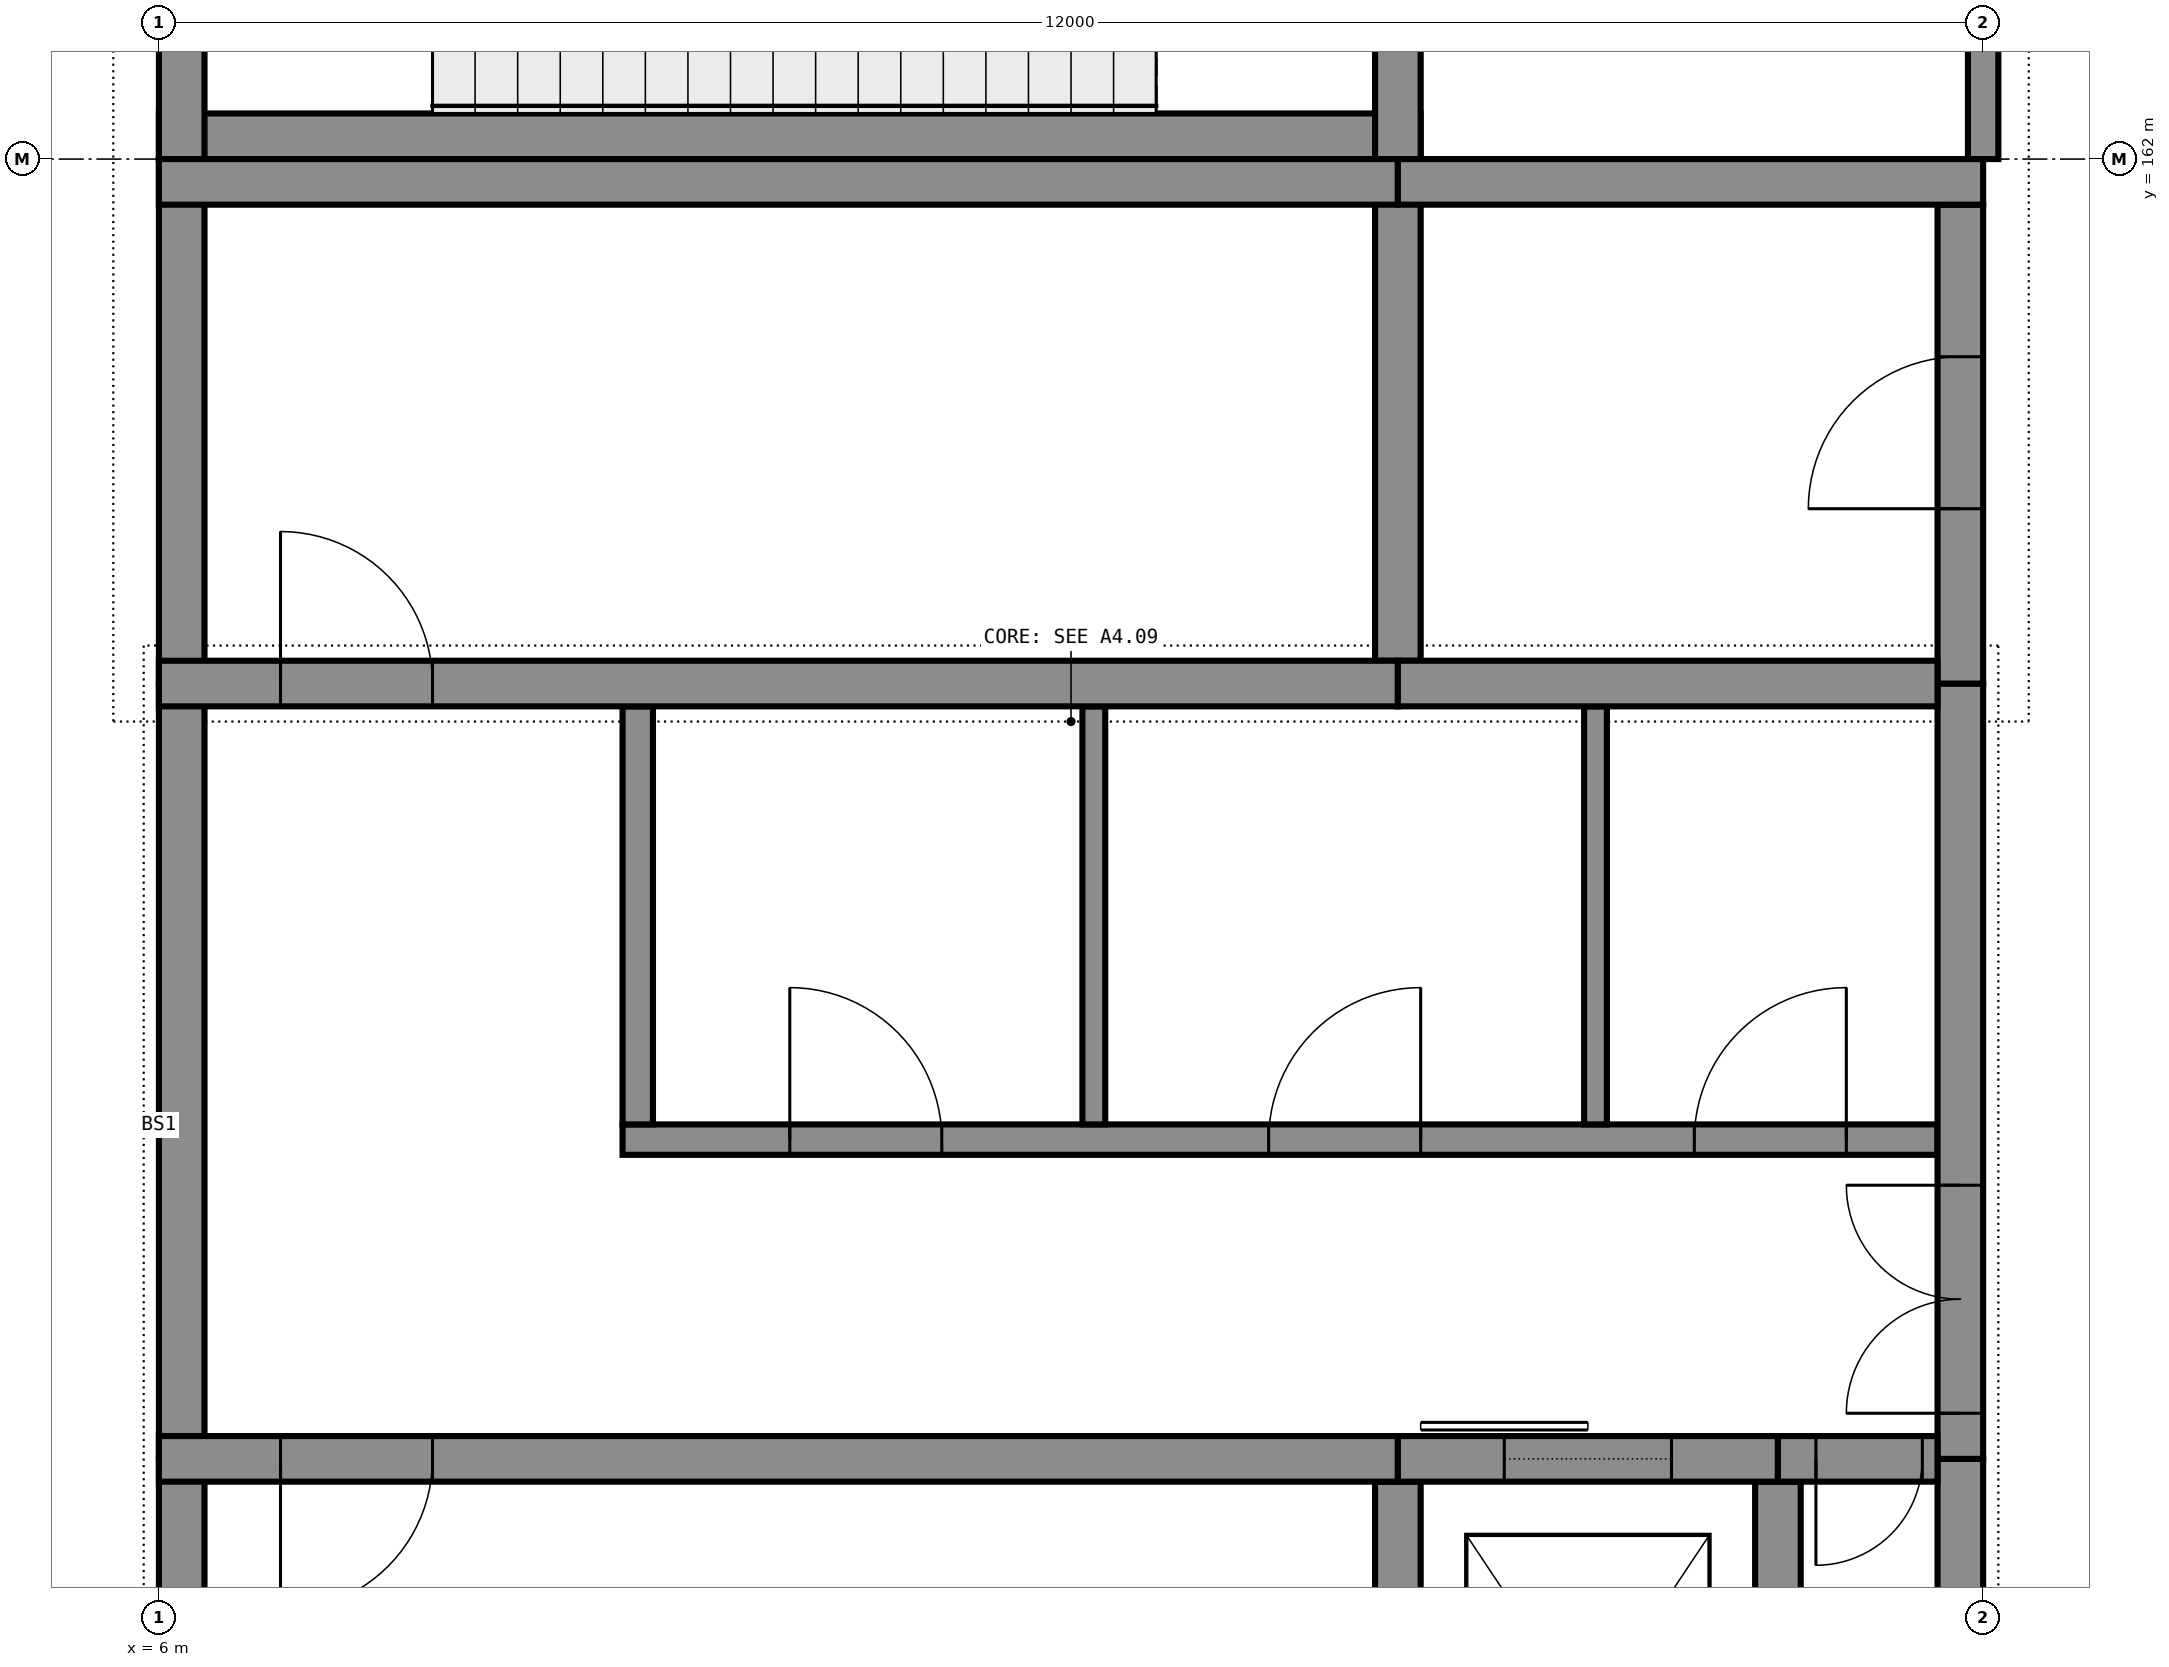
"""IFC4 building model, lengths in metres.
Left out: names, types, materials, properties, quantities, classifications, styles, units other than length and angle.
Written with IfcOpenShell. Run it as: python <this file> out.ifc"""

import sys

from ifc_helpers import new_model, si_unit, direction, frame, frame_2d, origin, place, context, subcontext, project, spatial, rectangle, extrude, element, fill, save


model = new_model("IFC4")
c1 = context("Model", 3, precision=1e-05, world=origin(), true_north=direction((0.0, 1.0)))
c2 = subcontext(c1, "Body", "Model", "MODEL_VIEW")
j1 = project(units=[si_unit("LENGTHUNIT", "METRE"), si_unit("PLANEANGLEUNIT", "RADIAN")], contexts=[c1])
p1 = place(None, origin())
s1 = spatial("IfcSite", under=j1, at=p1, CompositionType="ELEMENT")
p2 = place(p1, origin())
s2 = spatial("IfcBuilding", under=s1, at=p2, CompositionType="ELEMENT")
p3 = place(p2, frame((0.0, 0.0, -6.0)))
s3 = spatial("IfcBuildingStorey", under=s2, at=p3, CompositionType="ELEMENT", Elevation=-6.0)
p4 = place(p3, frame((6.0, 162.15, 0.0), z_axis=(0.0, 0.0, 1.0), x_axis=(1.0, 0.0, 0.0)))
e1 = element("IfcWall", 1, at=p4, inside=s3, PredefinedType="SHEAR", context=c2, shape_type="SweptSolid", body=[
    extrude(rectangle(XDim=8.3, YDim=0.3, at=frame_2d((4.15, 0.0))), origin(), (0.0, 0.0, 1.0), 5.7),
])
for number, where, z_axis, x_axis in (
    (2, (6.15, 162.0, 0.0), (0.0, 0.0, 1.0), (0.0, 1.0, 0.0)),
    (3, (14.15, 162.0, 0.0), (0.0, 0.0, 1.0), (0.0, 1.0, 0.0)),
):
    element("IfcWall", number, at=place(p3, frame(where, z_axis=z_axis, x_axis=x_axis)), inside=s3, PredefinedType="SHEAR", context=c2, shape_type="SweptSolid", body=[
        extrude(rectangle(XDim=3.3, YDim=0.3, at=frame_2d((1.65, 0.0))), origin(), (0.0, 0.0, 1.0), 5.7),
    ])
p5 = place(p3, frame((6.0, 161.85, 0.0), z_axis=(0.0, 0.0, 1.0), x_axis=(1.0, 0.0, 0.0)))
e4 = element("IfcWall", 4, at=p5, inside=s3, PredefinedType="SHEAR", context=c2, shape_type="SweptSolid", body=[
    extrude(rectangle(XDim=8.15, YDim=0.3, at=frame_2d((4.075, 0.0))), origin(), (0.0, 0.0, 1.0), 5.7),
])
p6 = place(p3, frame((14.15, 161.85, 0.0), z_axis=(0.0, 0.0, 1.0), x_axis=(1.0, 0.0, 0.0)))
e5 = element("IfcWall", 5, at=p6, inside=s3, PredefinedType="SHEAR", context=c2, shape_type="SweptSolid", body=[
    extrude(rectangle(XDim=3.85, YDim=0.3, at=frame_2d((1.925, 0.0))), origin(), (0.0, 0.0, 1.0), 5.7),
])
p7 = place(p3, frame((6.0, 153.45, 0.0), z_axis=(0.0, 0.0, 1.0), x_axis=(1.0, 0.0, 0.0)))
e6 = element("IfcWall", 6, at=p7, inside=s3, PredefinedType="SHEAR", context=c2, shape_type="SweptSolid", body=[
    extrude(rectangle(XDim=8.15, YDim=0.3, at=frame_2d((4.075, 0.0))), origin(), (0.0, 0.0, 1.0), 5.7),
])
p8 = place(p7, frame((0.8, 0.0, 0.0)))
e7 = element("IfcOpeningElement", 7, at=p8, cuts=e6, PredefinedType="OPENING", context=c2, shape_type="SweptSolid", body=[
    extrude(rectangle(XDim=1.0, YDim=2.1, at=frame_2d((0.5, 1.05))), frame((0.0, 0.16, 0.0), z_axis=(0.0, -1.0, 0.0), x_axis=(1.0, 0.0, 0.0)), (0.0, 0.0, 1.0), 0.32),
])
p9 = place(p3, frame((14.15, 153.45, 0.0), z_axis=(0.0, 0.0, 1.0), x_axis=(1.0, 0.0, 0.0)))
e8 = element("IfcWall", 8, at=p9, inside=s3, PredefinedType="SHEAR", context=c2, shape_type="SweptSolid", body=[
    extrude(rectangle(XDim=2.5, YDim=0.3, at=frame_2d((1.25, 0.0))), origin(), (0.0, 0.0, 1.0), 5.7),
])
p10 = place(p9, frame((0.7, 0.0, 0.0)))
e9 = element("IfcOpeningElement", 9, at=p10, cuts=e8, PredefinedType="OPENING", context=c2, shape_type="SweptSolid", body=[
    extrude(rectangle(XDim=1.1, YDim=2.1, at=frame_2d((0.55, 1.05))), frame((0.0, 0.16, 0.0), z_axis=(0.0, -1.0, 0.0), x_axis=(1.0, 0.0, 0.0)), (0.0, 0.0, 1.0), 0.32),
])
p11 = place(p3, frame((16.65, 153.45, 0.0), z_axis=(0.0, 0.0, 1.0), x_axis=(1.0, 0.0, 0.0)))
e10 = element("IfcWall", 10, at=p11, inside=s3, PredefinedType="SHEAR", context=c2, shape_type="SweptSolid", body=[
    extrude(rectangle(XDim=1.05, YDim=0.3, at=frame_2d((0.525, 0.0))), origin(), (0.0, 0.0, 1.0), 5.7),
])
p12 = place(p11, frame((0.25, 0.0, 0.0)))
e11 = element("IfcOpeningElement", 11, at=p12, cuts=e10, PredefinedType="OPENING", context=c2, shape_type="SweptSolid", body=[
    extrude(rectangle(XDim=0.7, YDim=2.1, at=frame_2d((0.35, 1.05))), frame((0.0, 0.16, 0.0), z_axis=(0.0, -1.0, 0.0), x_axis=(1.0, 0.0, 0.0)), (0.0, 0.0, 1.0), 0.32),
])
p13 = place(p3, frame((6.0, 158.55, 0.0), z_axis=(0.0, 0.0, 1.0), x_axis=(1.0, 0.0, 0.0)))
e12 = element("IfcWall", 12, at=p13, inside=s3, PredefinedType="SHEAR", context=c2, shape_type="SweptSolid", body=[
    extrude(rectangle(XDim=8.15, YDim=0.3, at=frame_2d((4.075, 0.0))), origin(), (0.0, 0.0, 1.0), 5.7),
])
p14 = place(p13, frame((0.8, 0.0, 0.0)))
e13 = element("IfcOpeningElement", 13, at=p14, cuts=e12, PredefinedType="OPENING", context=c2, shape_type="SweptSolid", body=[
    extrude(rectangle(XDim=1.0, YDim=2.1, at=frame_2d((0.5, 1.05))), frame((0.0, 0.16, 0.0), z_axis=(0.0, -1.0, 0.0), x_axis=(1.0, 0.0, 0.0)), (0.0, 0.0, 1.0), 0.32),
])
p15 = place(p3, frame((14.15, 158.55, 0.0), z_axis=(0.0, 0.0, 1.0), x_axis=(1.0, 0.0, 0.0)))
e14 = element("IfcWall", 14, at=p15, inside=s3, PredefinedType="SHEAR", context=c2, shape_type="SweptSolid", body=[
    extrude(rectangle(XDim=3.55, YDim=0.3, at=frame_2d((1.775, 0.0))), origin(), (0.0, 0.0, 1.0), 5.7),
])
p16 = place(p3, frame((6.15, 150.3, 0.0), z_axis=(0.0, 0.0, 1.0), x_axis=(0.0, 1.0, 0.0)))
e15 = element("IfcWall", 15, at=p16, inside=s3, PredefinedType="SHEAR", context=c2, shape_type="SweptSolid", body=[
    extrude(rectangle(XDim=3.15, YDim=0.3, at=frame_2d((1.575, 0.0))), origin(), (0.0, 0.0, 1.0), 5.7),
])
p17 = place(p3, frame((6.15, 153.45, 0.0), z_axis=(0.0, 0.0, 1.0), x_axis=(0.0, 1.0, 0.0)))
e16 = element("IfcWall", 16, at=p17, inside=s3, PredefinedType="SHEAR", context=c2, shape_type="SweptSolid", body=[
    extrude(rectangle(XDim=5.1, YDim=0.3, at=frame_2d((2.55, 0.0))), origin(), (0.0, 0.0, 1.0), 5.7),
])
p18 = place(p3, frame((6.15, 158.55, 0.0), z_axis=(0.0, 0.0, 1.0), x_axis=(0.0, 1.0, 0.0)))
e17 = element("IfcWall", 17, at=p18, inside=s3, PredefinedType="SHEAR", context=c2, shape_type="SweptSolid", body=[
    extrude(rectangle(XDim=3.45, YDim=0.3, at=frame_2d((1.725, 0.0))), origin(), (0.0, 0.0, 1.0), 5.7),
])
p19 = place(p3, frame((17.85, 150.3, 0.0), z_axis=(0.0, 0.0, 1.0), x_axis=(0.0, 1.0, 0.0)))
e18 = element("IfcWall", 18, at=p19, inside=s3, PredefinedType="SHEAR", context=c2, shape_type="SweptSolid", body=[
    extrude(rectangle(XDim=3.15, YDim=0.3, at=frame_2d((1.575, 0.0))), origin(), (0.0, 0.0, 1.0), 5.7),
])
p20 = place(p3, frame((17.85, 153.45, 0.0), z_axis=(0.0, 0.0, 1.0), x_axis=(0.0, 1.0, 0.0)))
e19 = element("IfcWall", 19, at=p20, inside=s3, PredefinedType="SHEAR", context=c2, shape_type="SweptSolid", body=[
    extrude(rectangle(XDim=5.1, YDim=0.3, at=frame_2d((2.55, 0.0))), origin(), (0.0, 0.0, 1.0), 5.7),
])
p21 = place(p20, frame((0.3, 0.0, 0.0)))
e20 = element("IfcOpeningElement", 20, at=p21, cuts=e19, PredefinedType="OPENING", context=c2, shape_type="SweptSolid", body=[
    extrude(rectangle(XDim=1.5, YDim=2.1, at=frame_2d((0.75, 1.05))), frame((0.0, 0.16, 0.0), z_axis=(0.0, -1.0, 0.0), x_axis=(1.0, 0.0, 0.0)), (0.0, 0.0, 1.0), 0.32),
])
p22 = place(p3, frame((17.85, 158.55, 0.0), z_axis=(0.0, 0.0, 1.0), x_axis=(0.0, 1.0, 0.0)))
e21 = element("IfcWall", 21, at=p22, inside=s3, PredefinedType="SHEAR", context=c2, shape_type="SweptSolid", body=[
    extrude(rectangle(XDim=3.15, YDim=0.3, at=frame_2d((1.575, 0.0))), origin(), (0.0, 0.0, 1.0), 5.7),
])
p23 = place(p22, frame((1.15, 0.0, 0.0)))
e22 = element("IfcOpeningElement", 22, at=p23, cuts=e21, PredefinedType="OPENING", context=c2, shape_type="SweptSolid", body=[
    extrude(rectangle(XDim=1.0, YDim=2.1, at=frame_2d((0.5, 1.05))), frame((0.0, 0.16, 0.0), z_axis=(0.0, -1.0, 0.0), x_axis=(1.0, 0.0, 0.0)), (0.0, 0.0, 1.0), 0.32),
])
p24 = place(p3, frame((14.15, 150.3, 0.0), z_axis=(0.0, 0.0, 1.0), x_axis=(0.0, 1.0, 0.0)))
e23 = element("IfcWall", 23, at=p24, inside=s3, PredefinedType="SHEAR", context=c2, shape_type="SweptSolid", body=[
    extrude(rectangle(XDim=3.0, YDim=0.3, at=frame_2d((1.5, 0.0))), origin(), (0.0, 0.0, 1.0), 5.7),
])
p25 = place(p3, frame((14.15, 158.7, 0.0), z_axis=(0.0, 0.0, 1.0), x_axis=(0.0, 1.0, 0.0)))
e24 = element("IfcWall", 24, at=p25, inside=s3, PredefinedType="SHEAR", context=c2, shape_type="SweptSolid", body=[
    extrude(rectangle(XDim=3.3, YDim=0.3, at=frame_2d((1.65, 0.0))), origin(), (0.0, 0.0, 1.0), 5.7),
])
p26 = place(p3, frame((16.65, 150.3, 0.0), z_axis=(0.0, 0.0, 1.0), x_axis=(0.0, 1.0, 0.0)))
e25 = element("IfcWall", 25, at=p26, inside=s3, PredefinedType="SHEAR", context=c2, shape_type="SweptSolid", body=[
    extrude(rectangle(XDim=3.0, YDim=0.3, at=frame_2d((1.5, 0.0))), origin(), (0.0, 0.0, 1.0), 5.7),
])
p27 = place(p3, frame((9.05, 155.55, 0.0), z_axis=(0.0, 0.0, 1.0), x_axis=(1.0, 0.0, 0.0)))
e26 = element("IfcWall", 26, at=p27, inside=s3, PredefinedType="PARTITIONING", context=c2, shape_type="SweptSolid", body=[
    extrude(rectangle(XDim=8.65, YDim=0.2, at=frame_2d((4.325, 0.0))), origin(), (0.0, 0.0, 1.0), 5.7),
])
p28 = place(p27, frame((1.1, 0.0, 0.0)))
e27 = element("IfcOpeningElement", 27, at=p28, cuts=e26, PredefinedType="OPENING", context=c2, shape_type="SweptSolid", body=[
    extrude(rectangle(XDim=1.0, YDim=2.1, at=frame_2d((0.5, 1.05))), frame((0.0, 0.11, 0.0), z_axis=(0.0, -1.0, 0.0), x_axis=(1.0, 0.0, 0.0)), (0.0, 0.0, 1.0), 0.22),
])
p29 = place(p27, frame((4.25, 0.0, 0.0)))
e28 = element("IfcOpeningElement", 28, at=p29, cuts=e26, PredefinedType="OPENING", context=c2, shape_type="SweptSolid", body=[
    extrude(rectangle(XDim=1.0, YDim=2.1, at=frame_2d((0.5, 1.05))), frame((0.0, 0.11, 0.0), z_axis=(0.0, -1.0, 0.0), x_axis=(1.0, 0.0, 0.0)), (0.0, 0.0, 1.0), 0.22),
])
p30 = place(p27, frame((7.05, 0.0, 0.0)))
e29 = element("IfcOpeningElement", 29, at=p30, cuts=e26, PredefinedType="OPENING", context=c2, shape_type="SweptSolid", body=[
    extrude(rectangle(XDim=1.0, YDim=2.1, at=frame_2d((0.5, 1.05))), frame((0.0, 0.11, 0.0), z_axis=(0.0, -1.0, 0.0), x_axis=(1.0, 0.0, 0.0)), (0.0, 0.0, 1.0), 0.22),
])
p31 = place(p3, frame((9.15, 155.65, 0.0), z_axis=(0.0, 0.0, 1.0), x_axis=(0.0, 1.0, 0.0)))
e30 = element("IfcWall", 30, at=p31, inside=s3, PredefinedType="PARTITIONING", context=c2, shape_type="SweptSolid", body=[
    extrude(rectangle(XDim=2.75, YDim=0.2, at=frame_2d((1.375, 0.0))), origin(), (0.0, 0.0, 1.0), 5.7),
])
for number, where, z_axis, x_axis in (
    (31, (12.15, 155.65, 0.0), (0.0, 0.0, 1.0), (0.0, 1.0, 0.0)),
    (32, (15.45, 155.65, 0.0), (0.0, 0.0, 1.0), (0.0, 1.0, 0.0)),
):
    element("IfcWall", number, at=place(p3, frame(where, z_axis=z_axis, x_axis=x_axis)), inside=s3, PredefinedType="PARTITIONING", context=c2, shape_type="SweptSolid", body=[
        extrude(rectangle(XDim=2.75, YDim=0.15, at=frame_2d((1.375, 0.0))), origin(), (0.0, 0.0, 1.0), 5.7),
    ])
p32 = place(p3, frame((18.0, 162.0, 0.0), z_axis=(0.0, 0.0, 1.0), x_axis=(0.0, 1.0, 0.0)))
e33 = element("IfcWall", 33, at=p32, inside=s3, PredefinedType="PARTITIONING", context=c2, shape_type="SweptSolid", body=[
    extrude(rectangle(XDim=5.9, YDim=0.2, at=frame_2d((2.95, 0.0))), origin(), (0.0, 0.0, 1.0), 4.7),
])
p33 = place(p32, frame((1.2, 0.0, 0.0)))
e34 = element("IfcOpeningElement", 34, at=p33, cuts=e33, PredefinedType="OPENING", context=c2, shape_type="SweptSolid", body=[
    extrude(rectangle(XDim=1.2, YDim=2.1, at=frame_2d((0.6, 1.05))), frame((0.0, 0.11, 0.0), z_axis=(0.0, -1.0, 0.0), x_axis=(1.0, 0.0, 0.0)), (0.0, 0.0, 1.0), 0.22),
])
p34 = place(p8, frame((1.0, 0.0, 0.0), z_axis=(0.0, 0.0, 1.0), x_axis=(-1.0, 0.0, 0.0)))
e35 = element("IfcDoor", 35, at=p34, inside=s3, OperationType="SINGLE_SWING_LEFT", PredefinedType="DOOR", context=c2, shape_type="SweptSolid", body=[
    extrude(rectangle(XDim=1.0, YDim=2.1, at=frame_2d((0.5, 1.05))), frame((0.0, 0.025, 0.0), z_axis=(0.0, -1.0, 0.0), x_axis=(1.0, 0.0, 0.0)), (0.0, 0.0, 1.0), 0.05),
])
fill(e7, e35)
p35 = place(p10, origin())
e36 = element("IfcDoor", 36, at=p35, inside=s3, OperationType="SLIDING_TO_LEFT", PredefinedType="DOOR", context=c2, shape_type="SweptSolid", body=[
    extrude(rectangle(XDim=1.1, YDim=2.1, at=frame_2d((0.55, 1.05))), frame((0.0, 0.025, 0.0), z_axis=(0.0, -1.0, 0.0), x_axis=(1.0, 0.0, 0.0)), (0.0, 0.0, 1.0), 0.05),
])
fill(e9, e36)
p36 = place(p12, frame((0.7, 0.0, 0.0), z_axis=(0.0, 0.0, 1.0), x_axis=(-1.0, 0.0, 0.0)))
e37 = element("IfcDoor", 37, at=p36, inside=s3, OperationType="SINGLE_SWING_LEFT", PredefinedType="DOOR", context=c2, shape_type="SweptSolid", body=[
    extrude(rectangle(XDim=0.7, YDim=2.1, at=frame_2d((0.35, 1.05))), frame((0.0, 0.025, 0.0), z_axis=(0.0, -1.0, 0.0), x_axis=(1.0, 0.0, 0.0)), (0.0, 0.0, 1.0), 0.05),
])
fill(e11, e37)
p37 = place(p21, origin())
e38 = element("IfcDoor", 38, at=p37, inside=s3, OperationType="DOUBLE_DOOR_SINGLE_SWING", PredefinedType="DOOR", context=c2, shape_type="SweptSolid", body=[
    extrude(rectangle(XDim=1.5, YDim=2.1, at=frame_2d((0.75, 1.05))), frame((0.0, 0.025, 0.0), z_axis=(0.0, -1.0, 0.0), x_axis=(1.0, 0.0, 0.0)), (0.0, 0.0, 1.0), 0.05),
])
fill(e20, e38)
p38 = place(p28, origin())
e39 = element("IfcDoor", 39, at=p38, inside=s3, OperationType="SINGLE_SWING_RIGHT", PredefinedType="DOOR", context=c2, shape_type="SweptSolid", body=[
    extrude(rectangle(XDim=1.0, YDim=2.1, at=frame_2d((0.5, 1.05))), frame((0.0, 0.025, 0.0), z_axis=(0.0, -1.0, 0.0), x_axis=(1.0, 0.0, 0.0)), (0.0, 0.0, 1.0), 0.05),
])
fill(e27, e39)
p39 = place(p29, origin())
e40 = element("IfcDoor", 40, at=p39, inside=s3, OperationType="SINGLE_SWING_LEFT", PredefinedType="DOOR", context=c2, shape_type="SweptSolid", body=[
    extrude(rectangle(XDim=1.0, YDim=2.1, at=frame_2d((0.5, 1.05))), frame((0.0, 0.025, 0.0), z_axis=(0.0, -1.0, 0.0), x_axis=(1.0, 0.0, 0.0)), (0.0, 0.0, 1.0), 0.05),
])
fill(e28, e40)
p40 = place(p30, origin())
e41 = element("IfcDoor", 41, at=p40, inside=s3, OperationType="SINGLE_SWING_LEFT", PredefinedType="DOOR", context=c2, shape_type="SweptSolid", body=[
    extrude(rectangle(XDim=1.0, YDim=2.1, at=frame_2d((0.5, 1.05))), frame((0.0, 0.025, 0.0), z_axis=(0.0, -1.0, 0.0), x_axis=(1.0, 0.0, 0.0)), (0.0, 0.0, 1.0), 0.05),
])
fill(e29, e41)
p41 = place(p14, origin())
e42 = element("IfcDoor", 42, at=p41, inside=s3, OperationType="SINGLE_SWING_RIGHT", PredefinedType="DOOR", context=c2, shape_type="SweptSolid", body=[
    extrude(rectangle(XDim=1.0, YDim=2.1, at=frame_2d((0.5, 1.05))), frame((0.0, 0.025, 0.0), z_axis=(0.0, -1.0, 0.0), x_axis=(1.0, 0.0, 0.0)), (0.0, 0.0, 1.0), 0.05),
])
fill(e13, e42)
p42 = place(p23, origin())
e43 = element("IfcDoor", 43, at=p42, inside=s3, OperationType="SINGLE_SWING_RIGHT", PredefinedType="DOOR", context=c2, shape_type="SweptSolid", body=[
    extrude(rectangle(XDim=1.0, YDim=2.1, at=frame_2d((0.5, 1.05))), frame((0.0, 0.025, 0.0), z_axis=(0.0, -1.0, 0.0), x_axis=(1.0, 0.0, 0.0)), (0.0, 0.0, 1.0), 0.05),
])
fill(e22, e43)
save(model, sys.argv[1])
